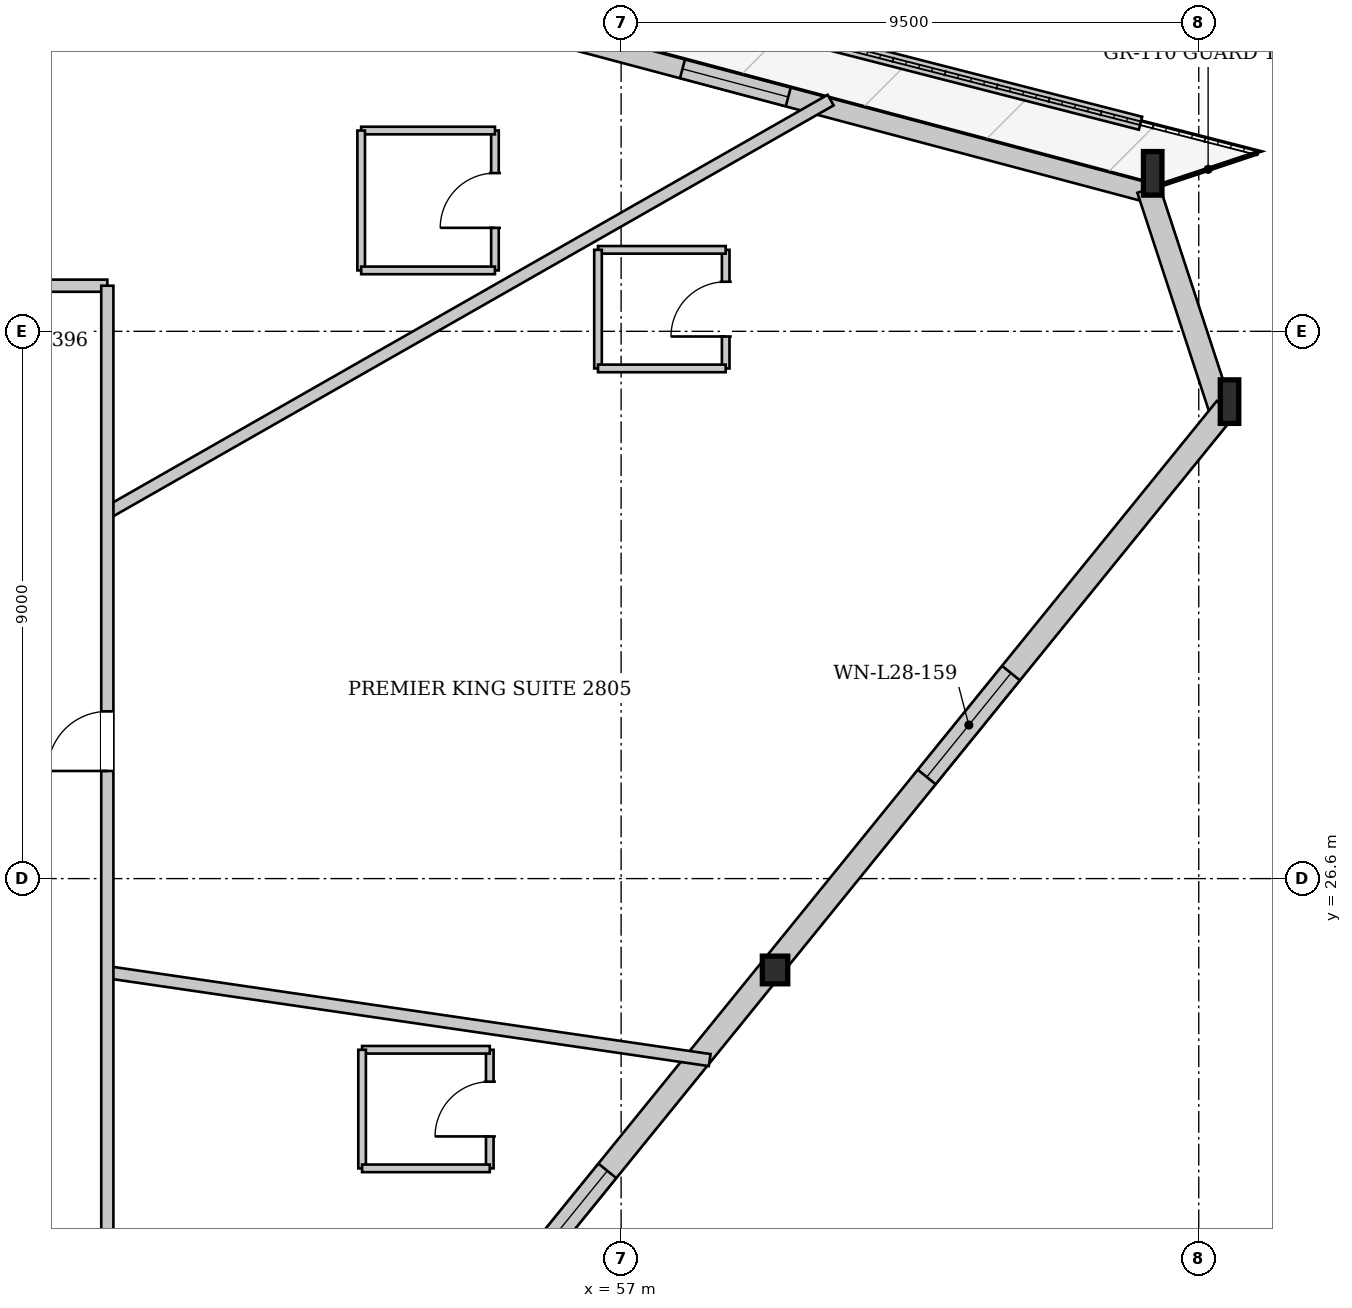
"""IFC4 building model, lengths in metres.
Left out: names, types, materials, properties, quantities, classifications, styles, units other than length and angle.
Written with IfcOpenShell. Run it as: python <this file> out.ifc"""

import sys

from ifc_helpers import new_model, si_unit, direction, frame, frame_2d, origin, origin_2d, place, context, subcontext, project, spatial, rectangle, i_section, extrude, source, transform, mapped, element, fill, save


model = new_model("IFC4")
c1 = context("Model", 3, precision=1e-05, world=origin(), true_north=direction((0.0, 1.0)))
c2 = subcontext(c1, "Body", "Model", "MODEL_VIEW")
j1 = project(units=[si_unit("LENGTHUNIT", "METRE"), si_unit("PLANEANGLEUNIT", "RADIAN")], contexts=[c1])
p1 = place(None, origin())
s1 = spatial("IfcSite", under=j1, at=p1, CompositionType="ELEMENT")
p2 = place(p1, origin())
s2 = spatial("IfcBuilding", under=s1, at=p2, CompositionType="ELEMENT")
p3 = place(p2, frame((0.0, 0.0, 109.25)))
s3 = spatial("IfcBuildingStorey", under=s2, at=p3, CompositionType="ELEMENT", Elevation=109.25)
m1 = source(origin(), c2, "Body", "SweptSolid", [
    extrude(i_section(OverallWidth=0.304, OverallDepth=0.716, WebThickness=0.021, FlangeThickness=0.04, at=origin_2d()), origin(), (0.0, 0.0, 1.0), 3.42),
])
p4 = place(p3, frame((67.092, 34.214, 0.0), z_axis=(-0.050037258281, 0.134265453391, 0.989681292543), x_axis=(-0.937043763109, -0.349211949994, 0.0)))
e1 = element("IfcColumn", 1, at=p4, inside=s3, PredefinedType="COLUMN", context=c2, shape_type="MappedRepresentation", body=[
    mapped(m1, transform((0.0, 0.0, 0.0), x_axis=(1.0, 0.0, 0.0), y_axis=(0.0, 1.0, 0.0), z_axis=(0.0, 0.0, 1.0), scale=1.0)),
])
m2 = source(origin(), c2, "Body", "SweptSolid", [
    extrude(i_section(OverallWidth=0.304, OverallDepth=0.716, WebThickness=0.021, FlangeThickness=0.04, at=origin_2d()), origin(), (0.0, 0.0, 1.0), 3.416),
])
p5 = place(p3, frame((65.852, 37.997, 0.0), z_axis=(-0.063752842961, 0.118071408712, 0.990956465976), x_axis=(-0.879923212228, -0.47511592331, 0.0)))
e2 = element("IfcColumn", 2, at=p5, inside=s3, PredefinedType="COLUMN", context=c2, shape_type="MappedRepresentation", body=[
    mapped(m2, transform((0.0, 0.0, 0.0), x_axis=(1.0, 0.0, 0.0), y_axis=(0.0, 1.0, 0.0), z_axis=(0.0, 0.0, 1.0), scale=1.0)),
])
m3 = source(origin(), c2, "Body", "SweptSolid", [
    extrude(i_section(OverallWidth=0.418, OverallDepth=0.455, WebThickness=0.038, FlangeThickness=0.059, at=origin_2d()), origin(), (0.0, 0.0, 1.0), 3.405),
])
p6 = place(p3, frame((59.548, 24.913, 0.0), z_axis=(-0.009392225398, 0.108333225776, 0.994070268288), x_axis=(-0.99626282193, -0.086373547103, 0.0)))
e3 = element("IfcColumn", 3, at=p6, inside=s3, PredefinedType="COLUMN", context=c2, shape_type="MappedRepresentation", body=[
    mapped(m3, transform((0.0, 0.0, 0.0), x_axis=(1.0, 0.0, 0.0), y_axis=(0.0, 1.0, 0.0), z_axis=(0.0, 0.0, 1.0), scale=1.0)),
])
p7 = place(p3, frame((43.241, 43.843, 0.0), z_axis=(0.0, 0.0, 1.0), x_axis=(0.966426577456, -0.256942932161, 0.0)))
e4 = element("IfcWall", 4, at=p7, inside=s3, PredefinedType="SOLIDWALL", context=c2, shape_type="SweptSolid", body=[
    extrude(rectangle(XDim=23.353, YDim=0.32, at=frame_2d((11.677, 0.0))), origin(), (0.0, 0.0, 1.0), 2.692),
])
p8 = place(p7, frame((6.923, 0.0, 0.0)))
e5 = element("IfcOpeningElement", 5, at=p8, cuts=e4, PredefinedType="OPENING", context=c2, shape_type="SweptSolid", body=[
    extrude(rectangle(XDim=1.1, YDim=2.3, at=frame_2d((0.55, 1.15))), frame((0.0, 0.17, 0.0), z_axis=(0.0, -1.0, 0.0), x_axis=(1.0, 0.0, 0.0)), (0.0, 0.0, 1.0), 0.34),
])
p9 = place(p7, frame((15.281, 0.0, 0.372)))
e6 = element("IfcOpeningElement", 6, at=p9, cuts=e4, PredefinedType="OPENING", context=c2, shape_type="SweptSolid", body=[
    extrude(rectangle(XDim=1.8, YDim=2.2, at=frame_2d((0.9, 1.1))), frame((0.0, 0.17, 0.0), z_axis=(0.0, -1.0, 0.0), x_axis=(1.0, 0.0, 0.0)), (0.0, 0.0, 1.0), 0.34),
])
p10 = place(p3, frame((65.671, 37.938, 0.0), z_axis=(0.0, 0.0, 1.0), x_axis=(0.311531602634, -0.950235792086, 0.0)))
e7 = element("IfcWall", 7, at=p10, inside=s3, PredefinedType="SOLIDWALL", context=c2, shape_type="SweptSolid", body=[
    extrude(rectangle(XDim=3.98, YDim=0.38, at=frame_2d((1.99, 0.0))), origin(), (0.0, 0.0, 1.0), 2.692),
])
p11 = place(p3, frame((66.944, 34.334, 0.0), z_axis=(0.0, 0.0, 1.0), x_axis=(-0.629923947576, -0.776656822715, 0.0)))
e8 = element("IfcWall", 8, at=p11, inside=s3, PredefinedType="SOLIDWALL", context=c2, shape_type="SweptSolid", body=[
    extrude(rectangle(XDim=23.953, YDim=0.38, at=frame_2d((11.976, 0.0))), origin(), (0.0, 0.0, 1.0), 2.692),
])
p12 = place(p11, frame((5.607, 0.0, 0.322)))
e9 = element("IfcOpeningElement", 9, at=p12, cuts=e8, PredefinedType="OPENING", context=c2, shape_type="SweptSolid", body=[
    extrude(rectangle(XDim=2.2, YDim=2.25, at=frame_2d((1.1, 1.125))), frame((0.0, 0.2, 0.0), z_axis=(0.0, -1.0, 0.0), x_axis=(1.0, 0.0, 0.0)), (0.0, 0.0, 1.0), 0.4),
])
p13 = place(p11, frame((16.146, 0.0, 0.322)))
e10 = element("IfcOpeningElement", 10, at=p13, cuts=e8, PredefinedType="OPENING", context=c2, shape_type="SweptSolid", body=[
    extrude(rectangle(XDim=2.2, YDim=2.25, at=frame_2d((1.1, 1.125))), frame((0.0, 0.2, 0.0), z_axis=(0.0, -1.0, 0.0), x_axis=(1.0, 0.0, 0.0)), (0.0, 0.0, 1.0), 0.4),
])
p14 = place(p3, frame((65.542, 39.022, 0.0), z_axis=(0.0, 0.0, 1.0), x_axis=(-0.968702389273, 0.248225061217, 0.0)))
e11 = element("IfcWall", 11, at=p14, inside=s3, PredefinedType="PARAPET", context=c2, shape_type="SweptSolid", body=[
    extrude(rectangle(XDim=20.754, YDim=0.22, at=frame_2d((10.377, 0.0))), origin(), (0.0, 0.0, 1.0), 0.3),
])
p15 = place(p3, frame((48.55, 25.061, 0.0), z_axis=(0.0, 0.0, 1.0), x_axis=(0.989528192481, -0.144339725252, 0.0)))
e12 = element("IfcWall", 12, at=p15, inside=s3, PredefinedType="PARTITIONING", context=c2, shape_type="SweptSolid", body=[
    extrude(rectangle(XDim=10.011, YDim=0.2, at=frame_2d((5.006, 0.0))), origin(), (0.0, 0.0, 1.0), 3.3),
])
p16 = place(p3, frame((48.55, 32.618, 0.0), z_axis=(0.0, 0.0, 1.0), x_axis=(0.868633427324, 0.495455314771, 0.0)))
e13 = element("IfcWall", 13, at=p16, inside=s3, PredefinedType="PARTITIONING", context=c2, shape_type="SweptSolid", body=[
    extrude(rectangle(XDim=13.695, YDim=0.2, at=frame_2d((6.847, 0.0))), origin(), (0.0, 0.0, 1.0), 3.3),
])
p17 = place(p3, frame((54.84, 21.835, 0.0), z_axis=(0.0, 0.0, 1.0), x_axis=(0.0, 1.0, 0.0)))
e14 = element("IfcWall", 14, at=p17, inside=s3, PredefinedType="PARTITIONING", context=c2, shape_type="SweptSolid", body=[
    extrude(rectangle(XDim=1.95, YDim=0.125, at=frame_2d((0.975, 0.0))), origin(), (0.0, 0.0, 1.0), 3.3),
])
p18 = place(p17, frame((0.525, 0.0, 0.0)))
e15 = element("IfcOpeningElement", 15, at=p18, cuts=e14, PredefinedType="OPENING", context=c2, shape_type="SweptSolid", body=[
    extrude(rectangle(XDim=0.9, YDim=2.1, at=frame_2d((0.45, 1.05))), frame((0.0, 0.073, 0.0), z_axis=(0.0, -1.0, 0.0), x_axis=(1.0, 0.0, 0.0)), (0.0, 0.0, 1.0), 0.145),
])
p19 = place(p3, frame((54.84, 23.785, 0.0), z_axis=(0.0, 0.0, 1.0), x_axis=(-1.0, 0.0, 0.0)))
e16 = element("IfcWall", 16, at=p19, inside=s3, PredefinedType="PARTITIONING", context=c2, shape_type="SweptSolid", body=[
    extrude(rectangle(XDim=2.1, YDim=0.125, at=frame_2d((1.05, 0.0))), origin(), (0.0, 0.0, 1.0), 3.3),
])
p20 = place(p3, frame((52.74, 23.785, 0.0), z_axis=(0.0, 0.0, 1.0), x_axis=(0.0, -1.0, 0.0)))
e17 = element("IfcWall", 17, at=p20, inside=s3, PredefinedType="PARTITIONING", context=c2, shape_type="SweptSolid", body=[
    extrude(rectangle(XDim=1.95, YDim=0.125, at=frame_2d((0.975, 0.0))), origin(), (0.0, 0.0, 1.0), 3.3),
])
p21 = place(p3, frame((52.74, 21.835, 0.0), z_axis=(0.0, 0.0, 1.0), x_axis=(1.0, 0.0, 0.0)))
e18 = element("IfcWall", 18, at=p21, inside=s3, PredefinedType="PARTITIONING", context=c2, shape_type="SweptSolid", body=[
    extrude(rectangle(XDim=2.1, YDim=0.125, at=frame_2d((1.05, 0.0))), origin(), (0.0, 0.0, 1.0), 3.3),
])
p22 = place(p3, frame((58.72, 34.99, 0.0), z_axis=(0.0, 0.0, 1.0), x_axis=(0.0, 1.0, 0.0)))
e19 = element("IfcWall", 19, at=p22, inside=s3, PredefinedType="PARTITIONING", context=c2, shape_type="SweptSolid", body=[
    extrude(rectangle(XDim=1.95, YDim=0.125, at=frame_2d((0.975, 0.0))), origin(), (0.0, 0.0, 1.0), 3.3),
])
p23 = place(p22, frame((0.525, 0.0, 0.0)))
e20 = element("IfcOpeningElement", 20, at=p23, cuts=e19, PredefinedType="OPENING", context=c2, shape_type="SweptSolid", body=[
    extrude(rectangle(XDim=0.9, YDim=2.1, at=frame_2d((0.45, 1.05))), frame((0.0, 0.073, 0.0), z_axis=(0.0, -1.0, 0.0), x_axis=(1.0, 0.0, 0.0)), (0.0, 0.0, 1.0), 0.145),
])
p24 = place(p3, frame((58.72, 36.94, 0.0), z_axis=(0.0, 0.0, 1.0), x_axis=(-1.0, 0.0, 0.0)))
e21 = element("IfcWall", 21, at=p24, inside=s3, PredefinedType="PARTITIONING", context=c2, shape_type="SweptSolid", body=[
    extrude(rectangle(XDim=2.1, YDim=0.125, at=frame_2d((1.05, 0.0))), origin(), (0.0, 0.0, 1.0), 3.3),
])
p25 = place(p3, frame((56.62, 36.94, 0.0), z_axis=(0.0, 0.0, 1.0), x_axis=(0.0, -1.0, 0.0)))
e22 = element("IfcWall", 22, at=p25, inside=s3, PredefinedType="PARTITIONING", context=c2, shape_type="SweptSolid", body=[
    extrude(rectangle(XDim=1.95, YDim=0.125, at=frame_2d((0.975, 0.0))), origin(), (0.0, 0.0, 1.0), 3.3),
])
p26 = place(p3, frame((56.62, 34.99, 0.0), z_axis=(0.0, 0.0, 1.0), x_axis=(1.0, 0.0, 0.0)))
e23 = element("IfcWall", 23, at=p26, inside=s3, PredefinedType="PARTITIONING", context=c2, shape_type="SweptSolid", body=[
    extrude(rectangle(XDim=2.1, YDim=0.125, at=frame_2d((1.05, 0.0))), origin(), (0.0, 0.0, 1.0), 2.795),
])
p27 = place(p3, frame((54.925, 36.602, 0.0), z_axis=(0.0, 0.0, 1.0), x_axis=(0.0, 1.0, 0.0)))
e24 = element("IfcWall", 24, at=p27, inside=s3, PredefinedType="PARTITIONING", context=c2, shape_type="SweptSolid", body=[
    extrude(rectangle(XDim=2.3, YDim=0.125, at=frame_2d((1.15, 0.0))), origin(), (0.0, 0.0, 1.0), 3.3),
])
p28 = place(p27, frame((0.7, 0.0, 0.0)))
e25 = element("IfcOpeningElement", 25, at=p28, cuts=e24, PredefinedType="OPENING", context=c2, shape_type="SweptSolid", body=[
    extrude(rectangle(XDim=0.9, YDim=2.1, at=frame_2d((0.45, 1.05))), frame((0.0, 0.073, 0.0), z_axis=(0.0, -1.0, 0.0), x_axis=(1.0, 0.0, 0.0)), (0.0, 0.0, 1.0), 0.145),
])
p29 = place(p3, frame((54.925, 38.902, 0.0), z_axis=(0.0, 0.0, 1.0), x_axis=(-1.0, 0.0, 0.0)))
e26 = element("IfcWall", 26, at=p29, inside=s3, PredefinedType="PARTITIONING", context=c2, shape_type="SweptSolid", body=[
    extrude(rectangle(XDim=2.2, YDim=0.125, at=frame_2d((1.1, 0.0))), origin(), (0.0, 0.0, 1.0), 3.3),
])
p30 = place(p3, frame((52.725, 38.902, 0.0), z_axis=(0.0, 0.0, 1.0), x_axis=(0.0, -1.0, 0.0)))
e27 = element("IfcWall", 27, at=p30, inside=s3, PredefinedType="PARTITIONING", context=c2, shape_type="SweptSolid", body=[
    extrude(rectangle(XDim=2.3, YDim=0.125, at=frame_2d((1.15, 0.0))), origin(), (0.0, 0.0, 1.0), 3.3),
])
p31 = place(p3, frame((52.725, 36.602, 0.0), z_axis=(0.0, 0.0, 1.0), x_axis=(1.0, 0.0, 0.0)))
e28 = element("IfcWall", 28, at=p31, inside=s3, PredefinedType="PARTITIONING", context=c2, shape_type="SweptSolid", body=[
    extrude(rectangle(XDim=2.2, YDim=0.125, at=frame_2d((1.1, 0.0))), origin(), (0.0, 0.0, 1.0), 2.985),
])
p32 = place(p3, frame((27.45, 36.35, 0.0), z_axis=(0.0, 0.0, 1.0), x_axis=(1.0, 0.0, 0.0)))
e29 = element("IfcWall", 29, at=p32, inside=s3, PredefinedType="PARTITIONING", context=c2, shape_type="SweptSolid", body=[
    extrude(rectangle(XDim=21.1, YDim=0.2, at=frame_2d((10.55, 0.0))), origin(), (0.0, 0.0, 1.0), 3.3),
])
p33 = place(p32, frame((18.598, 0.0, 0.0)))
e30 = element("IfcOpeningElement", 30, at=p33, cuts=e29, PredefinedType="OPENING", context=c2, shape_type="SweptSolid", body=[
    extrude(rectangle(XDim=0.98, YDim=2.15, at=frame_2d((0.49, 1.075))), frame((0.0, 0.11, 0.0), z_axis=(0.0, -1.0, 0.0), x_axis=(1.0, 0.0, 0.0)), (0.0, 0.0, 1.0), 0.22),
])
p34 = place(p32, frame((5.273, 0.0, 0.0)))
e31 = element("IfcOpeningElement", 31, at=p34, cuts=e29, PredefinedType="OPENING", context=c2, shape_type="SweptSolid", body=[
    extrude(rectangle(XDim=0.98, YDim=2.15, at=frame_2d((0.49, 1.075))), frame((0.0, 0.11, 0.0), z_axis=(0.0, -1.0, 0.0), x_axis=(1.0, 0.0, 0.0)), (0.0, 0.0, 1.0), 0.22),
])
p35 = place(p3, frame((48.55, 16.85, 0.0), z_axis=(0.0, 0.0, 1.0), x_axis=(0.0, 1.0, 0.0)))
e32 = element("IfcWall", 32, at=p35, inside=s3, PredefinedType="PARTITIONING", context=c2, shape_type="SweptSolid", body=[
    extrude(rectangle(XDim=19.5, YDim=0.2, at=frame_2d((9.75, 0.0))), origin(), (0.0, 0.0, 1.0), 3.3),
])
p36 = place(p35, frame((1.963, 0.0, 0.0)))
e33 = element("IfcOpeningElement", 33, at=p36, cuts=e32, PredefinedType="OPENING", context=c2, shape_type="SweptSolid", body=[
    extrude(rectangle(XDim=0.98, YDim=2.15, at=frame_2d((0.49, 1.075))), frame((0.0, 0.11, 0.0), z_axis=(0.0, -1.0, 0.0), x_axis=(1.0, 0.0, 0.0)), (0.0, 0.0, 1.0), 0.22),
])
p37 = place(p35, frame((11.52, 0.0, 0.0)))
e34 = element("IfcOpeningElement", 34, at=p37, cuts=e32, PredefinedType="OPENING", context=c2, shape_type="SweptSolid", body=[
    extrude(rectangle(XDim=0.98, YDim=2.15, at=frame_2d((0.49, 1.075))), frame((0.0, 0.11, 0.0), z_axis=(0.0, -1.0, 0.0), x_axis=(1.0, 0.0, 0.0)), (0.0, 0.0, 1.0), 0.22),
])
m4 = source(origin(), c2, "Body", "SweptSolid", [
    extrude(rectangle(XDim=1.8, YDim=2.2, at=frame_2d((0.9, 1.1))), frame((0.0, 0.03, 0.0), z_axis=(0.0, -1.0, 0.0), x_axis=(1.0, 0.0, 0.0)), (0.0, 0.0, 1.0), 0.06),
])
p38 = place(p9, origin())
e35 = element("IfcWindow", 35, at=p38, inside=s3, PartitioningType="SINGLE_PANEL", PredefinedType="WINDOW", context=c2, shape_type="MappedRepresentation", body=[
    mapped(m4, transform((0.0, 0.0, 0.0), x_axis=(1.0, 0.0, 0.0), y_axis=(0.0, 1.0, 0.0), z_axis=(0.0, 0.0, 1.0), scale=1.0)),
])
fill(e6, e35)
m5 = source(origin(), c2, "Body", "SweptSolid", [
    extrude(rectangle(XDim=2.2, YDim=2.25, at=frame_2d((1.1, 1.125))), frame((0.0, 0.03, 0.0), z_axis=(0.0, -1.0, 0.0), x_axis=(1.0, 0.0, 0.0)), (0.0, 0.0, 1.0), 0.06),
])
p39 = place(p12, origin())
e36 = element("IfcWindow", 36, at=p39, inside=s3, PartitioningType="SINGLE_PANEL", PredefinedType="WINDOW", context=c2, shape_type="MappedRepresentation", body=[
    mapped(m5, transform((0.0, 0.0, 0.0), x_axis=(1.0, 0.0, 0.0), y_axis=(0.0, 1.0, 0.0), z_axis=(0.0, 0.0, 1.0), scale=1.0)),
])
fill(e9, e36)
p40 = place(p13, origin())
e37 = element("IfcWindow", 37, at=p40, inside=s3, PartitioningType="SINGLE_PANEL", PredefinedType="WINDOW", context=c2, shape_type="MappedRepresentation", body=[
    mapped(m5, transform((0.0, 0.0, 0.0), x_axis=(1.0, 0.0, 0.0), y_axis=(0.0, 1.0, 0.0), z_axis=(0.0, 0.0, 1.0), scale=1.0)),
])
fill(e10, e37)
m6 = source(origin(), c2, "Body", "SweptSolid", [
    extrude(rectangle(XDim=0.9, YDim=2.1, at=frame_2d((0.45, 1.05))), frame((0.0, 0.025, 0.0), z_axis=(0.0, -1.0, 0.0), x_axis=(1.0, 0.0, 0.0)), (0.0, 0.0, 1.0), 0.05),
])
p41 = place(p18, origin())
e38 = element("IfcDoor", 38, at=p41, inside=s3, OperationType="SINGLE_SWING_LEFT", PredefinedType="DOOR", context=c2, shape_type="MappedRepresentation", body=[
    mapped(m6, transform((0.0, 0.0, 0.0), x_axis=(1.0, 0.0, 0.0), y_axis=(0.0, 1.0, 0.0), z_axis=(0.0, 0.0, 1.0), scale=1.0)),
])
fill(e15, e38)
p42 = place(p23, origin())
e39 = element("IfcDoor", 39, at=p42, inside=s3, OperationType="SINGLE_SWING_LEFT", PredefinedType="DOOR", context=c2, shape_type="MappedRepresentation", body=[
    mapped(m6, transform((0.0, 0.0, 0.0), x_axis=(1.0, 0.0, 0.0), y_axis=(0.0, 1.0, 0.0), z_axis=(0.0, 0.0, 1.0), scale=1.0)),
])
fill(e20, e39)
p43 = place(p28, origin())
e40 = element("IfcDoor", 40, at=p43, inside=s3, OperationType="SINGLE_SWING_LEFT", PredefinedType="DOOR", context=c2, shape_type="MappedRepresentation", body=[
    mapped(m6, transform((0.0, 0.0, 0.0), x_axis=(1.0, 0.0, 0.0), y_axis=(0.0, 1.0, 0.0), z_axis=(0.0, 0.0, 1.0), scale=1.0)),
])
fill(e25, e40)
m7 = source(origin(), c2, "Body", "SweptSolid", [
    extrude(rectangle(XDim=0.98, YDim=2.15, at=frame_2d((0.49, 1.075))), frame((0.0, 0.025, 0.0), z_axis=(0.0, -1.0, 0.0), x_axis=(1.0, 0.0, 0.0)), (0.0, 0.0, 1.0), 0.05),
])
p44 = place(p37, origin())
e41 = element("IfcDoor", 41, at=p44, inside=s3, OperationType="SINGLE_SWING_LEFT", PredefinedType="DOOR", context=c2, shape_type="MappedRepresentation", body=[
    mapped(m7, transform((0.0, 0.0, 0.0), x_axis=(1.0, 0.0, 0.0), y_axis=(0.0, 1.0, 0.0), z_axis=(0.0, 0.0, 1.0), scale=1.0)),
])
fill(e34, e41)
save(model, sys.argv[1])
